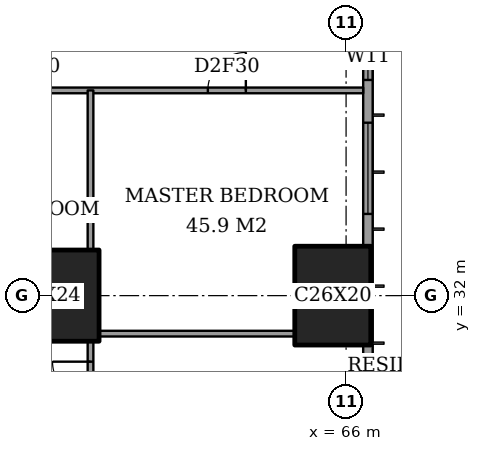
"""IFC4 building model, lengths in metres.
Left out: names, types, materials, properties, quantities, classifications, styles, units other than length and angle.
Written with IfcOpenShell. Run it as: python <this file> out.ifc"""

import sys

from ifc_helpers import new_model, si_unit, direction, frame, frame_2d, origin, origin_2d, place, context, subcontext, project, spatial, rectangle, extrude, element, fill, save


model = new_model("IFC4")
c1 = context("Model", 3, precision=1e-05, world=origin(), true_north=direction((0.0, 1.0)))
c2 = subcontext(c1, "Body", "Model", "MODEL_VIEW")
j1 = project(units=[si_unit("LENGTHUNIT", "METRE"), si_unit("PLANEANGLEUNIT", "RADIAN")], contexts=[c1])
p1 = place(None, origin())
s1 = spatial("IfcSite", under=j1, at=p1, CompositionType="ELEMENT")
p2 = place(p1, origin())
s2 = spatial("IfcBuilding", under=s1, at=p2, CompositionType="ELEMENT")
p3 = place(p2, frame((0.0, 0.0, 153.8)))
s3 = spatial("IfcBuildingStorey", under=s2, at=p3, CompositionType="ELEMENT", Elevation=153.8)
p4 = place(p3, frame((58.0, 32.0, 0.0), z_axis=(0.0, 0.0, 1.0), x_axis=(1.0, 0.0, 0.0)))
e1 = element("IfcColumn", 1, at=p4, inside=s3, PredefinedType="COLUMN", context=c2, shape_type="SweptSolid", body=[
    extrude(rectangle(XDim=3.0, YDim=2.4, at=origin_2d()), origin(), (0.0, 0.0, 1.0), 3.6),
])
p5 = place(p3, frame((65.65, 32.0, 0.0), z_axis=(0.0, 0.0, 1.0), x_axis=(0.0, 1.0, 0.0)))
e2 = element("IfcColumn", 2, at=p5, inside=s3, PredefinedType="COLUMN", context=c2, shape_type="SweptSolid", body=[
    extrude(rectangle(XDim=2.6, YDim=2.0, at=origin_2d()), origin(), (0.0, 0.0, 1.0), 3.6),
])
p6 = place(p3, frame((66.575, 3.175, 0.0), z_axis=(0.0, 0.0, 1.0), x_axis=(0.0, 1.0, 0.0)))
e3 = element("IfcWall", 3, at=p6, inside=s3, PredefinedType="SOLIDWALL", context=c2, shape_type="SweptSolid", body=[
    extrude(rectangle(XDim=41.65, YDim=0.25, at=frame_2d((20.825, 0.0))), origin(), (0.0, 0.0, 1.0), 3.6),
])
p7 = place(p6, frame((0.775, 0.0, 0.4)))
e4 = element("IfcOpeningElement", 4, at=p7, cuts=e3, PredefinedType="OPENING", context=c2, shape_type="SweptSolid", body=[
    extrude(rectangle(XDim=2.4, YDim=2.2, at=frame_2d((1.2, 1.1))), frame((0.0, 0.135, 0.0), z_axis=(0.0, -1.0, 0.0), x_axis=(1.0, 0.0, 0.0)), (0.0, 0.0, 1.0), 0.27),
])
p8 = place(p6, frame((6.225, 0.0, 0.4)))
e5 = element("IfcOpeningElement", 5, at=p8, cuts=e3, PredefinedType="OPENING", context=c2, shape_type="SweptSolid", body=[
    extrude(rectangle(XDim=1.2, YDim=2.2, at=frame_2d((0.6, 1.1))), frame((0.0, 0.135, 0.0), z_axis=(0.0, -1.0, 0.0), x_axis=(1.0, 0.0, 0.0)), (0.0, 0.0, 1.0), 0.27),
])
p9 = place(p6, frame((8.475, 0.0, 0.4)))
e6 = element("IfcOpeningElement", 6, at=p9, cuts=e3, PredefinedType="OPENING", context=c2, shape_type="SweptSolid", body=[
    extrude(rectangle(XDim=2.4, YDim=2.2, at=frame_2d((1.2, 1.1))), frame((0.0, 0.135, 0.0), z_axis=(0.0, -1.0, 0.0), x_axis=(1.0, 0.0, 0.0)), (0.0, 0.0, 1.0), 0.27),
])
p10 = place(p6, frame((15.775, 0.0, 0.4)))
e7 = element("IfcOpeningElement", 7, at=p10, cuts=e3, PredefinedType="OPENING", context=c2, shape_type="SweptSolid", body=[
    extrude(rectangle(XDim=2.4, YDim=2.2, at=frame_2d((1.2, 1.1))), frame((0.0, 0.135, 0.0), z_axis=(0.0, -1.0, 0.0), x_axis=(1.0, 0.0, 0.0)), (0.0, 0.0, 1.0), 0.27),
])
p11 = place(p6, frame((23.475, 0.0, 0.4)))
e8 = element("IfcOpeningElement", 8, at=p11, cuts=e3, PredefinedType="OPENING", context=c2, shape_type="SweptSolid", body=[
    extrude(rectangle(XDim=2.4, YDim=2.2, at=frame_2d((1.2, 1.1))), frame((0.0, 0.135, 0.0), z_axis=(0.0, -1.0, 0.0), x_axis=(1.0, 0.0, 0.0)), (0.0, 0.0, 1.0), 0.27),
])
p12 = place(p6, frame((30.975, 0.0, 0.4)))
e9 = element("IfcOpeningElement", 9, at=p12, cuts=e3, PredefinedType="OPENING", context=c2, shape_type="SweptSolid", body=[
    extrude(rectangle(XDim=2.4, YDim=2.2, at=frame_2d((1.2, 1.1))), frame((0.0, 0.135, 0.0), z_axis=(0.0, -1.0, 0.0), x_axis=(1.0, 0.0, 0.0)), (0.0, 0.0, 1.0), 0.27),
])
p13 = place(p6, frame((34.5, 0.0, 0.4)))
e10 = element("IfcOpeningElement", 10, at=p13, cuts=e3, PredefinedType="OPENING", context=c2, shape_type="SweptSolid", body=[
    extrude(rectangle(XDim=1.2, YDim=2.2, at=frame_2d((0.6, 1.1))), frame((0.0, 0.135, 0.0), z_axis=(0.0, -1.0, 0.0), x_axis=(1.0, 0.0, 0.0)), (0.0, 0.0, 1.0), 0.27),
])
p14 = place(p6, frame((38.475, 0.0, 0.4)))
e11 = element("IfcOpeningElement", 11, at=p14, cuts=e3, PredefinedType="OPENING", context=c2, shape_type="SweptSolid", body=[
    extrude(rectangle(XDim=2.4, YDim=2.2, at=frame_2d((1.2, 1.1))), frame((0.0, 0.135, 0.0), z_axis=(0.0, -1.0, 0.0), x_axis=(1.0, 0.0, 0.0)), (0.0, 0.0, 1.0), 0.27),
])
p15 = place(p3, frame((59.5, 31.0, 0.0), z_axis=(0.0, 0.0, 1.0), x_axis=(1.0, 0.0, 0.0)))
e12 = element("IfcWall", 12, at=p15, inside=s3, PredefinedType="PARTITIONING", context=c2, shape_type="SweptSolid", body=[
    extrude(rectangle(XDim=5.15, YDim=0.15, at=frame_2d((2.575, 0.0))), origin(), (0.0, 0.0, 1.0), 3.35),
])
p16 = place(p3, frame((41.439, 37.4, 0.0), z_axis=(0.0, 0.0, 1.0), x_axis=(1.0, 0.0, 0.0)))
e13 = element("IfcWall", 13, at=p16, inside=s3, PredefinedType="PARTITIONING", context=c2, shape_type="SweptSolid", body=[
    extrude(rectangle(XDim=25.011, YDim=0.15, at=frame_2d((12.505, 0.0))), origin(), (0.0, 0.0, 1.0), 3.35),
])
p17 = place(p16, frame((10.761, 0.0, 0.0)))
e14 = element("IfcOpeningElement", 14, at=p17, cuts=e13, PredefinedType="OPENING", context=c2, shape_type="SweptSolid", body=[
    extrude(rectangle(XDim=1.0, YDim=2.1, at=frame_2d((0.5, 1.05))), frame((0.0, 0.085, 0.0), z_axis=(0.0, -1.0, 0.0), x_axis=(1.0, 0.0, 0.0)), (0.0, 0.0, 1.0), 0.17),
])
p18 = place(p16, frame((20.924, 0.0, 0.0)))
e15 = element("IfcOpeningElement", 15, at=p18, cuts=e13, PredefinedType="OPENING", context=c2, shape_type="SweptSolid", body=[
    extrude(rectangle(XDim=1.0, YDim=2.1, at=frame_2d((0.5, 1.05))), frame((0.0, 0.085, 0.0), z_axis=(0.0, -1.0, 0.0), x_axis=(1.0, 0.0, 0.0)), (0.0, 0.0, 1.0), 0.17),
])
p19 = place(p16, frame((15.749, 0.0, 0.0)))
e16 = element("IfcOpeningElement", 16, at=p19, cuts=e13, PredefinedType="OPENING", context=c2, shape_type="SweptSolid", body=[
    extrude(rectangle(XDim=0.9, YDim=2.1, at=frame_2d((0.45, 1.05))), frame((0.0, 0.085, 0.0), z_axis=(0.0, -1.0, 0.0), x_axis=(1.0, 0.0, 0.0)), (0.0, 0.0, 1.0), 0.17),
])
p20 = place(p16, frame((12.961, 0.0, 0.0)))
e17 = element("IfcOpeningElement", 17, at=p20, cuts=e13, PredefinedType="OPENING", context=c2, shape_type="SweptSolid", body=[
    extrude(rectangle(XDim=1.0, YDim=2.1, at=frame_2d((0.5, 1.05))), frame((0.0, 0.085, 0.0), z_axis=(0.0, -1.0, 0.0), x_axis=(1.0, 0.0, 0.0)), (0.0, 0.0, 1.0), 0.17),
])
p21 = place(p16, frame((7.911, 0.0, 0.0)))
e18 = element("IfcOpeningElement", 18, at=p21, cuts=e13, PredefinedType="OPENING", context=c2, shape_type="SweptSolid", body=[
    extrude(rectangle(XDim=0.9, YDim=2.1, at=frame_2d((0.45, 1.05))), frame((0.0, 0.085, 0.0), z_axis=(0.0, -1.0, 0.0), x_axis=(1.0, 0.0, 0.0)), (0.0, 0.0, 1.0), 0.17),
])
p22 = place(p16, frame((2.836, 0.0, 0.0)))
e19 = element("IfcOpeningElement", 19, at=p22, cuts=e13, PredefinedType="OPENING", context=c2, shape_type="SweptSolid", body=[
    extrude(rectangle(XDim=1.0, YDim=2.1, at=frame_2d((0.5, 1.05))), frame((0.0, 0.085, 0.0), z_axis=(0.0, -1.0, 0.0), x_axis=(1.0, 0.0, 0.0)), (0.0, 0.0, 1.0), 0.17),
])
p23 = place(p3, frame((59.275, 28.35, 0.0), z_axis=(0.0, 0.0, 1.0), x_axis=(0.0, 1.0, 0.0)))
e20 = element("IfcWall", 20, at=p23, inside=s3, PredefinedType="PARTITIONING", context=c2, shape_type="SweptSolid", body=[
    extrude(rectangle(XDim=2.45, YDim=0.15, at=frame_2d((1.225, 0.0))), origin(), (0.0, 0.0, 1.0), 3.35),
])
p24 = place(p23, frame((0.913, 0.0, 0.0)))
e21 = element("IfcOpeningElement", 21, at=p24, cuts=e20, PredefinedType="OPENING", context=c2, shape_type="SweptSolid", body=[
    extrude(rectangle(XDim=1.0, YDim=2.1, at=frame_2d((0.5, 1.05))), frame((0.0, 0.085, 0.0), z_axis=(0.0, -1.0, 0.0), x_axis=(1.0, 0.0, 0.0)), (0.0, 0.0, 1.0), 0.17),
])
p25 = place(p3, frame((59.275, 33.2, 0.0), z_axis=(0.0, 0.0, 1.0), x_axis=(0.0, 1.0, 0.0)))
e22 = element("IfcWall", 22, at=p25, inside=s3, PredefinedType="PARTITIONING", context=c2, shape_type="SweptSolid", body=[
    extrude(rectangle(XDim=4.2, YDim=0.15, at=frame_2d((2.1, 0.0))), origin(), (0.0, 0.0, 1.0), 3.35),
])
p26 = place(p12, origin())
e23 = element("IfcWindow", 23, at=p26, inside=s3, PartitioningType="SINGLE_PANEL", PredefinedType="WINDOW", context=c2, shape_type="SweptSolid", body=[
    extrude(rectangle(XDim=2.4, YDim=2.2, at=frame_2d((1.2, 1.1))), frame((0.0, 0.03, 0.0), z_axis=(0.0, -1.0, 0.0), x_axis=(1.0, 0.0, 0.0)), (0.0, 0.0, 1.0), 0.06),
])
fill(e9, e23)
p27 = place(p13, origin())
e24 = element("IfcWindow", 24, at=p27, inside=s3, PartitioningType="SINGLE_PANEL", PredefinedType="WINDOW", context=c2, shape_type="SweptSolid", body=[
    extrude(rectangle(XDim=1.2, YDim=2.2, at=frame_2d((0.6, 1.1))), frame((0.0, 0.03, 0.0), z_axis=(0.0, -1.0, 0.0), x_axis=(1.0, 0.0, 0.0)), (0.0, 0.0, 1.0), 0.06),
])
fill(e10, e24)
p28 = place(p18, origin())
e25 = element("IfcDoor", 25, at=p28, inside=s3, OperationType="SINGLE_SWING_LEFT", PredefinedType="DOOR", context=c2, shape_type="SweptSolid", body=[
    extrude(rectangle(XDim=1.0, YDim=2.1, at=frame_2d((0.5, 1.05))), frame((0.0, 0.025, 0.0), z_axis=(0.0, -1.0, 0.0), x_axis=(1.0, 0.0, 0.0)), (0.0, 0.0, 1.0), 0.05),
])
fill(e15, e25)
p29 = place(p24, origin())
e26 = element("IfcDoor", 26, at=p29, inside=s3, OperationType="SINGLE_SWING_LEFT", PredefinedType="DOOR", context=c2, shape_type="SweptSolid", body=[
    extrude(rectangle(XDim=1.0, YDim=2.1, at=frame_2d((0.5, 1.05))), frame((0.0, 0.025, 0.0), z_axis=(0.0, -1.0, 0.0), x_axis=(1.0, 0.0, 0.0)), (0.0, 0.0, 1.0), 0.05),
])
fill(e21, e26)
save(model, sys.argv[1])
